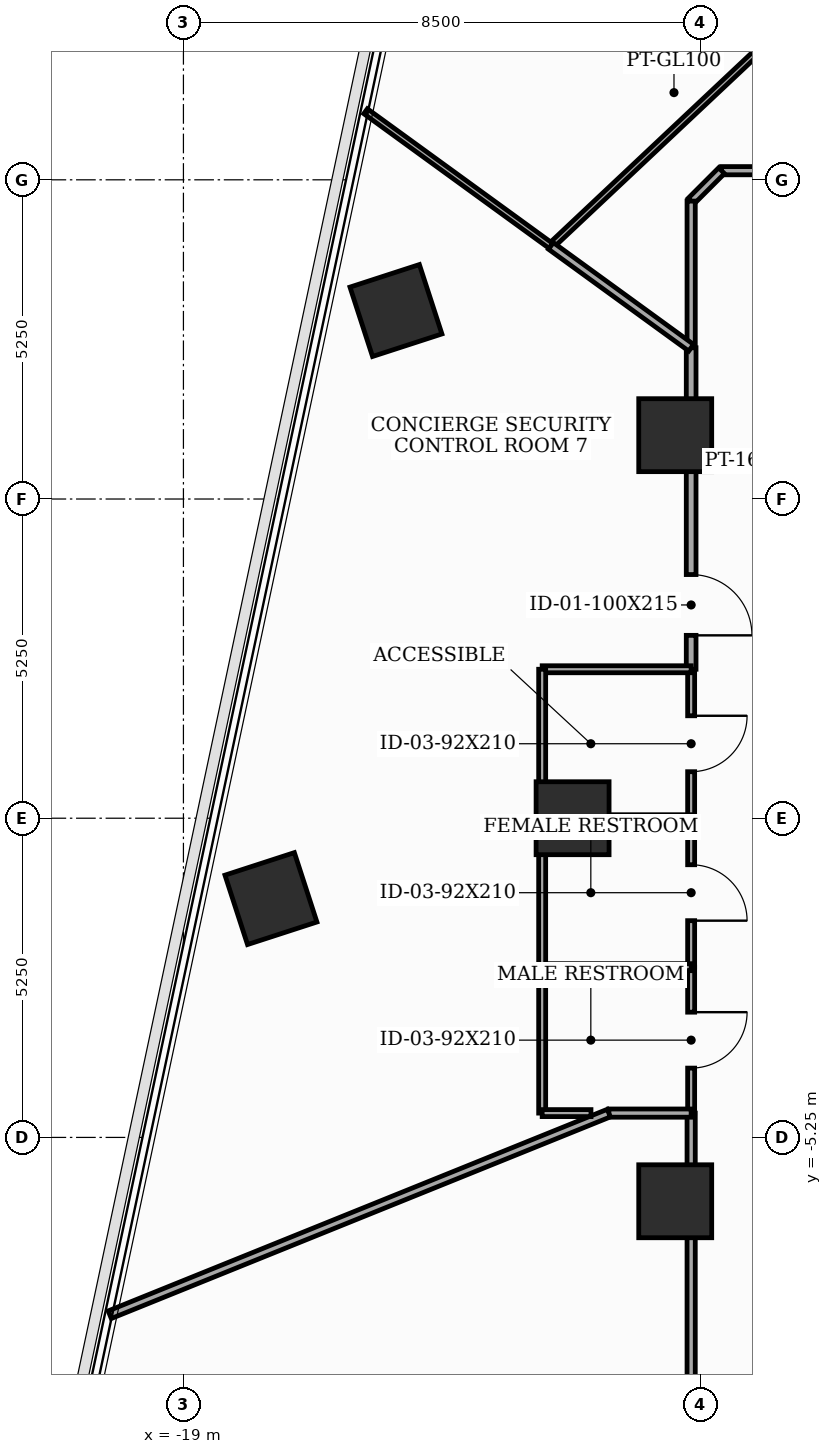
"""IFC4 building model, lengths in metres.
Left out: names, types, materials, properties, quantities, classifications, styles, units other than length and angle.
Written with IfcOpenShell. Run it as: python <this file> out.ifc"""

import sys

from ifc_helpers import new_model, si_unit, direction, frame, frame_2d, origin, origin_2d, place, context, subcontext, project, spatial, rectangle, extrude, element, fill, save


model = new_model("IFC4")
c1 = context("Model", 3, precision=1e-05, world=origin(), true_north=direction((0.0, 1.0)))
c2 = subcontext(c1, "Body", "Model", "MODEL_VIEW")
j1 = project(units=[si_unit("LENGTHUNIT", "METRE"), si_unit("PLANEANGLEUNIT", "RADIAN")], contexts=[c1])
p1 = place(None, origin())
s1 = spatial("IfcSite", under=j1, at=p1, CompositionType="ELEMENT")
p2 = place(p1, origin())
s2 = spatial("IfcBuilding", under=s1, at=p2, CompositionType="ELEMENT")
p3 = place(p2, frame((0.0, 0.0, 116.2)))
s3 = spatial("IfcBuildingStorey", under=s2, at=p3, CompositionType="ELEMENT", Elevation=116.2)
for number, where, z_axis, x_axis in (
    (1, (-10.912, 6.3, 0.0), (0.0, 0.0, 1.0), (1.0, 0.0, 0.0)),
    (2, (-12.6, 0.0, 0.0), (0.0, 0.0, 1.0), (1.0, 0.0, 0.0)),
    (3, (-10.912, -6.3, 0.0), (0.0, 0.0, 1.0), (1.0, 0.0, 0.0)),
    (4, (-15.505, 8.35, 0.0), (0.0, 0.0, 1.0), (0.951, 0.309, 0.0)),
    (5, (-17.561, -1.322, 0.0), (0.0, 0.0, 1.0), (0.951, 0.309, 0.0)),
):
    element("IfcColumn", number, at=place(p3, frame(where, z_axis=z_axis, x_axis=x_axis)), inside=s3, PredefinedType="COLUMN", context=c2, shape_type="SweptSolid", body=[
        extrude(rectangle(XDim=1.2, YDim=1.2, at=origin_2d()), origin(), (0.0, 0.0, 1.0), 3.7),
    ])
p4 = place(p3, frame((-10.65, -4.85, 0.0), z_axis=(0.0, 0.0, 1.0), x_axis=(0.0, -1.0, 0.0)))
e6 = element("IfcWall", 6, at=p4, inside=s3, PredefinedType="PARTITIONING", context=c2, shape_type="SweptSolid", body=[
    extrude(rectangle(XDim=5.3, YDim=0.135, at=frame_2d((2.65, 0.0))), origin(), (0.0, 0.0, 1.0), 2.085),
])
p5 = place(p3, frame((-10.65, 0.0, 0.0), z_axis=(0.0, 0.0, 1.0), x_axis=(0.0, -1.0, 0.0)))
e7 = element("IfcWall", 7, at=p5, inside=s3, PredefinedType="PARTITIONING", context=c2, shape_type="SweptSolid", body=[
    extrude(rectangle(XDim=2.45, YDim=0.115, at=frame_2d((1.225, 0.0))), origin(), (0.0, 0.0, 1.0), 2.785),
])
p6 = place(p5, frame((0.765, 0.0, 0.0)))
e8 = element("IfcOpeningElement", 8, at=p6, cuts=e7, PredefinedType="OPENING", context=c2, shape_type="SweptSolid", body=[
    extrude(rectangle(XDim=0.92, YDim=2.1, at=frame_2d((0.46, 1.05))), frame((0.0, 0.067, 0.0), z_axis=(0.0, -1.0, 0.0), x_axis=(1.0, 0.0, 0.0)), (0.0, 0.0, 1.0), 0.135),
])
p7 = place(p3, frame((-10.65, -2.45, 0.0), z_axis=(0.0, 0.0, 1.0), x_axis=(0.0, -1.0, 0.0)))
e9 = element("IfcWall", 9, at=p7, inside=s3, PredefinedType="PARTITIONING", context=c2, shape_type="SweptSolid", body=[
    extrude(rectangle(XDim=2.4, YDim=0.115, at=frame_2d((1.2, 0.0))), origin(), (0.0, 0.0, 1.0), 3.5),
])
p8 = place(p7, frame((0.74, 0.0, 0.0)))
e10 = element("IfcOpeningElement", 10, at=p8, cuts=e9, PredefinedType="OPENING", context=c2, shape_type="SweptSolid", body=[
    extrude(rectangle(XDim=0.92, YDim=2.1, at=frame_2d((0.46, 1.05))), frame((0.0, 0.067, 0.0), z_axis=(0.0, -1.0, 0.0), x_axis=(1.0, 0.0, 0.0)), (0.0, 0.0, 1.0), 0.135),
])
p9 = place(p3, frame((-1.497, 10.65, 0.0), z_axis=(0.0, 0.0, 1.0), x_axis=(-1.0, 0.0, 0.0)))
e11 = element("IfcWall", 11, at=p9, inside=s3, PredefinedType="PARTITIONING", context=c2, shape_type="SweptSolid", body=[
    extrude(rectangle(XDim=8.653, YDim=0.135, at=frame_2d((4.326, 0.0))), origin(), (0.0, 0.0, 1.0), 2.085),
])
p10 = place(p9, frame((1.256, 0.0, 0.0)))
e12 = element("IfcOpeningElement", 12, at=p10, cuts=e11, PredefinedType="OPENING", context=c2, shape_type="SweptSolid", body=[
    extrude(rectangle(XDim=0.95, YDim=2.035, at=frame_2d((0.475, 1.018))), frame((0.0, 0.077, 0.0), z_axis=(0.0, -1.0, 0.0), x_axis=(1.0, 0.0, 0.0)), (0.0, 0.0, 1.0), 0.155),
])
p11 = place(p3, frame((-10.15, 10.65, 0.0), z_axis=(0.0, 0.0, 1.0), x_axis=(-0.707106781187, -0.707106781187, 0.0)))
e13 = element("IfcWall", 13, at=p11, inside=s3, PredefinedType="PARTITIONING", context=c2, shape_type="SweptSolid", body=[
    extrude(rectangle(XDim=0.707, YDim=0.135, at=frame_2d((0.354, 0.0))), origin(), (0.0, 0.0, 1.0), 3.5),
])
p12 = place(p3, frame((-10.65, 10.15, 0.0), z_axis=(0.0, 0.0, 1.0), x_axis=(0.0, -1.0, 0.0)))
e14 = element("IfcWall", 14, at=p12, inside=s3, PredefinedType="PARTITIONING", context=c2, shape_type="SweptSolid", body=[
    extrude(rectangle(XDim=2.412, YDim=0.135, at=frame_2d((1.206, 0.0))), origin(), (0.0, 0.0, 1.0), 3.5),
])
p13 = place(p3, frame((-10.65, 2.45, 0.0), z_axis=(0.0, 0.0, 1.0), x_axis=(0.0, -1.0, 0.0)))
e15 = element("IfcWall", 15, at=p13, inside=s3, PredefinedType="PARTITIONING", context=c2, shape_type="SweptSolid", body=[
    extrude(rectangle(XDim=2.45, YDim=0.115, at=frame_2d((1.225, 0.0))), origin(), (0.0, 0.0, 1.0), 2.785),
])
p14 = place(p13, frame((0.765, 0.0, 0.0)))
e16 = element("IfcOpeningElement", 16, at=p14, cuts=e15, PredefinedType="OPENING", context=c2, shape_type="SweptSolid", body=[
    extrude(rectangle(XDim=0.92, YDim=2.1, at=frame_2d((0.46, 1.05))), frame((0.0, 0.067, 0.0), z_axis=(0.0, -1.0, 0.0), x_axis=(1.0, 0.0, 0.0)), (0.0, 0.0, 1.0), 0.135),
])
p15 = place(p3, frame((-10.65, 7.738, 0.0), z_axis=(0.0, 0.0, 1.0), x_axis=(0.0, -1.0, 0.0)))
e17 = element("IfcWall", 17, at=p15, inside=s3, PredefinedType="PARTITIONING", context=c2, shape_type="SweptSolid", body=[
    extrude(rectangle(XDim=5.288, YDim=0.16, at=frame_2d((2.644, 0.0))), origin(), (0.0, 0.0, 1.0), 2.785),
])
p16 = place(p15, frame((3.73, 0.0, 0.0)))
e18 = element("IfcOpeningElement", 18, at=p16, cuts=e17, PredefinedType="OPENING", context=c2, shape_type="SweptSolid", body=[
    extrude(rectangle(XDim=1.0, YDim=2.15, at=frame_2d((0.5, 1.075))), frame((0.0, 0.09, 0.0), z_axis=(0.0, -1.0, 0.0), x_axis=(1.0, 0.0, 0.0)), (0.0, 0.0, 1.0), 0.18),
])
p17 = place(p3, frame((-10.65, -4.85, 0.0), z_axis=(0.0, 0.0, 1.0), x_axis=(-1.0, 0.0, 0.0)))
e19 = element("IfcWall", 19, at=p17, inside=s3, PredefinedType="PARTITIONING", context=c2, shape_type="SweptSolid", body=[
    extrude(rectangle(XDim=1.354, YDim=0.135, at=frame_2d((0.677, 0.0))), origin(), (0.0, 0.0, 1.0), 2.785),
])
p18 = place(p3, frame((-12.004, -4.85, 0.0), z_axis=(0.0, 0.0, 1.0), x_axis=(-0.927193028103, -0.374583887317, 0.0)))
e20 = element("IfcWall", 20, at=p18, inside=s3, PredefinedType="PARTITIONING", context=c2, shape_type="SweptSolid", body=[
    extrude(rectangle(XDim=8.852, YDim=0.135, at=frame_2d((4.426, 0.0))), origin(), (0.0, 0.0, 1.0), 2.085),
])
p19 = place(p3, frame((-13.1, -2.45, 0.0), z_axis=(0.0, 0.0, 1.0), x_axis=(1.0, 0.0, 0.0)))
e21 = element("IfcWall", 21, at=p19, inside=s3, PredefinedType="PARTITIONING", context=c2, shape_type="SweptSolid", body=[
    extrude(rectangle(XDim=2.45, YDim=0.115, at=frame_2d((1.225, 0.0))), origin(), (0.0, 0.0, 1.0), 2.785),
])
p20 = place(p3, frame((-10.65, 0.0, 0.0), z_axis=(0.0, 0.0, 1.0), x_axis=(-1.0, 0.0, 0.0)))
e22 = element("IfcWall", 22, at=p20, inside=s3, PredefinedType="PARTITIONING", context=c2, shape_type="SweptSolid", body=[
    extrude(rectangle(XDim=2.45, YDim=0.115, at=frame_2d((1.225, 0.0))), origin(), (0.0, 0.0, 1.0), 2.085),
])
p21 = place(p3, frame((-13.1, 0.0, 0.0), z_axis=(0.0, 0.0, 1.0), x_axis=(0.0, -1.0, 0.0)))
e23 = element("IfcWall", 23, at=p21, inside=s3, PredefinedType="PARTITIONING", context=c2, shape_type="SweptSolid", body=[
    extrude(rectangle(XDim=2.45, YDim=0.115, at=frame_2d((1.225, 0.0))), origin(), (0.0, 0.0, 1.0), 2.085),
])
p22 = place(p3, frame((-13.1, -2.45, 0.0), z_axis=(0.0, 0.0, 1.0), x_axis=(0.0, -1.0, 0.0)))
e24 = element("IfcWall", 24, at=p22, inside=s3, PredefinedType="PARTITIONING", context=c2, shape_type="SweptSolid", body=[
    extrude(rectangle(XDim=2.4, YDim=0.115, at=frame_2d((1.2, 0.0))), origin(), (0.0, 0.0, 1.0), 3.5),
])
p23 = place(p3, frame((-13.1, -4.85, 0.0), z_axis=(0.0, 0.0, 1.0), x_axis=(1.0, 0.0, 0.0)))
e25 = element("IfcWall", 25, at=p23, inside=s3, PredefinedType="PARTITIONING", context=c2, shape_type="SweptSolid", body=[
    extrude(rectangle(XDim=0.802, YDim=0.115, at=frame_2d((0.401, 0.0))), origin(), (0.0, 0.0, 1.0), 3.5),
])
p24 = place(p3, frame((-12.956, 9.413, 0.0), z_axis=(0.0, 0.0, 1.0), x_axis=(0.728413758726, 0.685137501599, 0.0)))
e26 = element("IfcWall", 26, at=p24, inside=s3, PredefinedType="MOVABLE", context=c2, shape_type="SweptSolid", body=[
    extrude(rectangle(XDim=6.403, YDim=0.1, at=frame_2d((3.202, 0.0))), origin(), (0.0, 0.0, 1.0), 2.085),
])
p25 = place(p3, frame((-16.004, 11.628, 0.0), z_axis=(0.0, 0.0, 1.0), x_axis=(0.809035789462, -0.587759382205, 0.0)))
e27 = element("IfcWall", 27, at=p25, inside=s3, PredefinedType="MOVABLE", context=c2, shape_type="SweptSolid", body=[
    extrude(rectangle(XDim=3.768, YDim=0.1, at=frame_2d((1.884, 0.0))), origin(), (0.0, 0.0, 1.0), 2.085),
])
p26 = place(p3, frame((-12.956, 9.413, 0.0), z_axis=(0.0, 0.0, 1.0), x_axis=(0.809095220568, -0.587677568105, 0.0)))
e28 = element("IfcWall", 28, at=p26, inside=s3, PredefinedType="PARTITIONING", context=c2, shape_type="SweptSolid", body=[
    extrude(rectangle(XDim=2.85, YDim=0.135, at=frame_2d((1.425, 0.0))), origin(), (0.0, 0.0, 1.0), 3.125),
])
p27 = place(p3, frame((-10.65, 2.45, 0.0), z_axis=(0.0, 0.0, 1.0), x_axis=(-1.0, 0.0, 0.0)))
e29 = element("IfcWall", 29, at=p27, inside=s3, PredefinedType="PARTITIONING", context=c2, shape_type="SweptSolid", body=[
    extrude(rectangle(XDim=2.45, YDim=0.115, at=frame_2d((1.225, 0.0))), origin(), (0.0, 0.0, 1.0), 2.785),
])
p28 = place(p3, frame((-13.1, 2.45, 0.0), z_axis=(0.0, 0.0, 1.0), x_axis=(0.0, -1.0, 0.0)))
e30 = element("IfcWall", 30, at=p28, inside=s3, PredefinedType="PARTITIONING", context=c2, shape_type="SweptSolid", body=[
    extrude(rectangle(XDim=2.45, YDim=0.115, at=frame_2d((1.225, 0.0))), origin(), (0.0, 0.0, 1.0), 2.085),
])
p29 = place(p6, origin())
e31 = element("IfcDoor", 31, at=p29, inside=s3, OperationType="SINGLE_SWING_RIGHT", PredefinedType="DOOR", context=c2, shape_type="SweptSolid", body=[
    extrude(rectangle(XDim=0.92, YDim=2.1, at=frame_2d((0.46, 1.05))), frame((0.0, 0.025, 0.0), z_axis=(0.0, -1.0, 0.0), x_axis=(1.0, 0.0, 0.0)), (0.0, 0.0, 1.0), 0.05),
])
fill(e8, e31)
p30 = place(p8, origin())
e32 = element("IfcDoor", 32, at=p30, inside=s3, OperationType="SINGLE_SWING_LEFT", PredefinedType="DOOR", context=c2, shape_type="SweptSolid", body=[
    extrude(rectangle(XDim=0.92, YDim=2.1, at=frame_2d((0.46, 1.05))), frame((0.0, 0.025, 0.0), z_axis=(0.0, -1.0, 0.0), x_axis=(1.0, 0.0, 0.0)), (0.0, 0.0, 1.0), 0.05),
])
fill(e10, e32)
p31 = place(p14, origin())
e33 = element("IfcDoor", 33, at=p31, inside=s3, OperationType="SINGLE_SWING_LEFT", PredefinedType="DOOR", context=c2, shape_type="SweptSolid", body=[
    extrude(rectangle(XDim=0.92, YDim=2.1, at=frame_2d((0.46, 1.05))), frame((0.0, 0.025, 0.0), z_axis=(0.0, -1.0, 0.0), x_axis=(1.0, 0.0, 0.0)), (0.0, 0.0, 1.0), 0.05),
])
fill(e16, e33)
p32 = place(p16, origin())
e34 = element("IfcDoor", 34, at=p32, inside=s3, OperationType="SINGLE_SWING_RIGHT", PredefinedType="DOOR", context=c2, shape_type="SweptSolid", body=[
    extrude(rectangle(XDim=1.0, YDim=2.15, at=frame_2d((0.5, 1.075))), frame((0.0, 0.025, 0.0), z_axis=(0.0, -1.0, 0.0), x_axis=(1.0, 0.0, 0.0)), (0.0, 0.0, 1.0), 0.05),
])
fill(e18, e34)
save(model, sys.argv[1])
